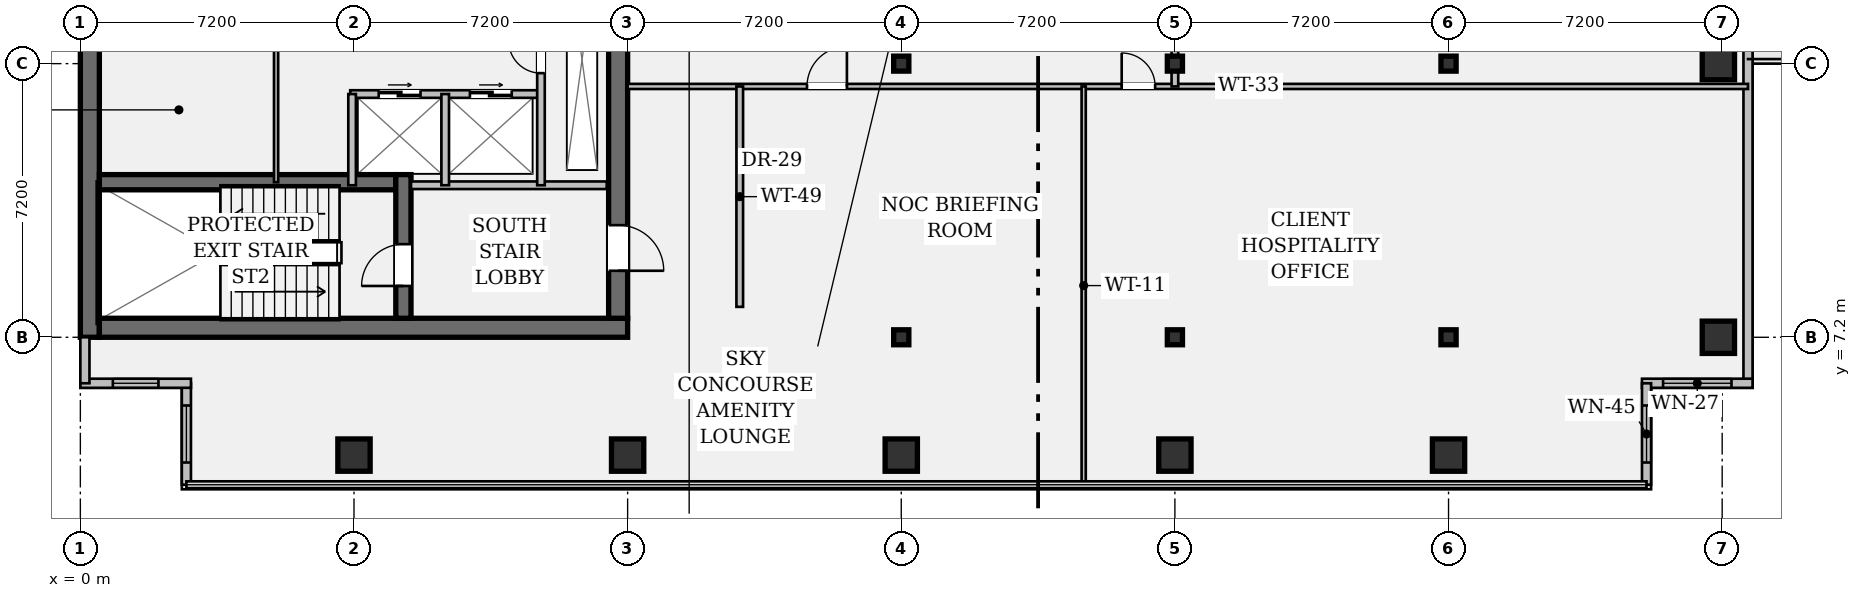
"""IFC4 building model, lengths in metres.
Left out: names, types, materials, properties, quantities, classifications, styles, units other than length and angle.
Written with IfcOpenShell. Run it as: python <this file> out.ifc"""

import sys

from ifc_helpers import new_model, si_unit, direction, frame, frame_2d, origin, origin_2d, place, context, subcontext, project, spatial, rectangle, hollow_rectangle, i_section, extrude, element, fill, save


model = new_model("IFC4")
c1 = context("Model", 3, precision=1e-05, world=origin(), true_north=direction((0.0, 1.0)))
c2 = subcontext(c1, "Body", "Model", "MODEL_VIEW")
j1 = project(units=[si_unit("LENGTHUNIT", "METRE"), si_unit("PLANEANGLEUNIT", "RADIAN")], contexts=[c1])
p1 = place(None, origin())
s1 = spatial("IfcSite", under=j1, at=p1, CompositionType="ELEMENT")
p2 = place(p1, origin())
s2 = spatial("IfcBuilding", under=s1, at=p2, CompositionType="ELEMENT")
p3 = place(p2, frame((0.0, 0.0, 168.7)))
s3 = spatial("IfcBuildingStorey", under=s2, at=p3, CompositionType="ELEMENT", Elevation=168.7)
p4 = place(p3, frame((0.25, 7.2, 0.0), z_axis=(0.0, 0.0, 1.0), x_axis=(0.0, 1.0, 0.0)))
e1 = element("IfcWall", 1, at=p4, inside=s3, PredefinedType="SHEAR", context=c2, shape_type="SweptSolid", body=[
    extrude(rectangle(XDim=28.8, YDim=0.5, at=frame_2d((14.4, 0.0))), origin(), (0.0, 0.0, 1.0), 4.29),
])
p5 = place(p3, frame((0.5, 7.45, 0.0), z_axis=(0.0, 0.0, 1.0), x_axis=(1.0, 0.0, 0.0)))
e2 = element("IfcWall", 2, at=p5, inside=s3, PredefinedType="SHEAR", context=c2, shape_type="SweptSolid", body=[
    extrude(rectangle(XDim=13.9, YDim=0.5, at=frame_2d((6.95, 0.0))), origin(), (0.0, 0.0, 1.0), 4.29),
])
p6 = place(p3, frame((14.15, 35.5, 0.0), z_axis=(0.0, 0.0, 1.0), x_axis=(0.0, -1.0, 0.0)))
e3 = element("IfcWall", 3, at=p6, inside=s3, PredefinedType="SHEAR", context=c2, shape_type="SweptSolid", body=[
    extrude(rectangle(XDim=27.8, YDim=0.5, at=frame_2d((13.9, 0.0))), origin(), (0.0, 0.0, 1.0), 4.29),
])
p7 = place(p6, frame((1.4, 0.0, 0.0)))
e4 = element("IfcOpeningElement", 4, at=p7, cuts=e3, PredefinedType="OPENING", context=c2, shape_type="SweptSolid", body=[
    extrude(rectangle(XDim=1.2, YDim=2.15, at=frame_2d((0.6, 1.075))), frame((0.0, 0.262, 0.0), z_axis=(0.0, -1.0, 0.0), x_axis=(1.0, 0.0, 0.0)), (0.0, 0.0, 1.0), 0.524),
])
p8 = place(p6, frame((25.35, 0.0, 0.0)))
e5 = element("IfcOpeningElement", 5, at=p8, cuts=e3, PredefinedType="OPENING", context=c2, shape_type="SweptSolid", body=[
    extrude(rectangle(XDim=1.2, YDim=2.15, at=frame_2d((0.6, 1.075))), frame((0.0, 0.262, 0.0), z_axis=(0.0, -1.0, 0.0), x_axis=(1.0, 0.0, 0.0)), (0.0, 0.0, 1.0), 0.524),
])
p9 = place(p6, frame((14.7, 0.0, 0.0)))
e6 = element("IfcOpeningElement", 6, at=p9, cuts=e3, PredefinedType="OPENING", context=c2, shape_type="SweptSolid", body=[
    extrude(rectangle(XDim=1.6, YDim=2.2, at=frame_2d((0.8, 1.1))), frame((0.0, 0.262, 0.0), z_axis=(0.0, -1.0, 0.0), x_axis=(1.0, 0.0, 0.0)), (0.0, 0.0, 1.0), 0.524),
])
p10 = place(p3, frame((0.5, 11.28, 0.0), z_axis=(0.0, 0.0, 1.0), x_axis=(1.0, 0.0, 0.0)))
e7 = element("IfcWall", 7, at=p10, inside=s3, PredefinedType="SHEAR", context=c2, shape_type="SweptSolid", body=[
    extrude(rectangle(XDim=7.8, YDim=0.4, at=frame_2d((3.9, 0.0))), origin(), (0.0, 0.0, 1.0), 4.29),
])
p11 = place(p3, frame((8.5, 7.7, 0.0), z_axis=(0.0, 0.0, 1.0), x_axis=(0.0, 1.0, 0.0)))
e8 = element("IfcWall", 8, at=p11, inside=s3, PredefinedType="SHEAR", context=c2, shape_type="SweptSolid", body=[
    extrude(rectangle(XDim=3.78, YDim=0.4, at=frame_2d((1.89, 0.0))), origin(), (0.0, 0.0, 1.0), 4.29),
])
p12 = place(p11, frame((0.85, 0.0, 0.0)))
e9 = element("IfcOpeningElement", 9, at=p12, cuts=e8, PredefinedType="OPENING", context=c2, shape_type="SweptSolid", body=[
    extrude(rectangle(XDim=1.1, YDim=2.15, at=frame_2d((0.55, 1.075))), frame((0.0, 0.212, 0.0), z_axis=(0.0, -1.0, 0.0), x_axis=(1.0, 0.0, 0.0)), (0.0, 0.0, 1.0), 0.424),
])
for number, where, z_axis, x_axis in (
    (10, (7.2, 4.1, 0.0), (0.0, 0.0, 1.0), (1.0, 0.0, 0.0)),
    (11, (14.4, 4.1, 0.0), (0.0, 0.0, 1.0), (1.0, 0.0, 0.0)),
    (12, (21.6, 4.1, 0.0), (0.0, 0.0, 1.0), (1.0, 0.0, 0.0)),
):
    element("IfcColumn", number, at=place(p3, frame(where, z_axis=z_axis, x_axis=x_axis)), inside=s3, PredefinedType="COLUMN", context=c2, shape_type="SweptSolid", body=[
        extrude(hollow_rectangle(XDim=0.85, YDim=0.85, WallThickness=0.05, at=origin_2d()), origin(), (0.0, 0.0, 1.0), 4.29),
    ])
for number, where, z_axis, x_axis in (
    (13, (21.6, 7.2, 0.0), (0.0, 0.0, 1.0), (1.0, 0.0, 0.0)),
    (14, (21.6, 14.4, 0.0), (0.0, 0.0, 1.0), (1.0, 0.0, 0.0)),
):
    element("IfcColumn", number, at=place(p3, frame(where, z_axis=z_axis, x_axis=x_axis)), inside=s3, PredefinedType="COLUMN", context=c2, shape_type="SweptSolid", body=[
        extrude(i_section(OverallWidth=0.399, OverallDepth=0.394, WebThickness=0.023, FlangeThickness=0.037, FilletRadius=0.018, at=origin_2d()), origin(), (0.0, 0.0, 1.0), 4.29),
    ])
p13 = place(p3, frame((28.8, 4.1, 0.0), z_axis=(0.0, 0.0, 1.0), x_axis=(1.0, 0.0, 0.0)))
e15 = element("IfcColumn", 15, at=p13, inside=s3, PredefinedType="COLUMN", context=c2, shape_type="SweptSolid", body=[
    extrude(hollow_rectangle(XDim=0.85, YDim=0.85, WallThickness=0.05, at=origin_2d()), origin(), (0.0, 0.0, 1.0), 4.29),
])
for number, where, z_axis, x_axis in (
    (16, (28.8, 7.2, 0.0), (0.0, 0.0, 1.0), (1.0, 0.0, 0.0)),
    (17, (28.8, 14.4, 0.0), (0.0, 0.0, 1.0), (1.0, 0.0, 0.0)),
):
    element("IfcColumn", number, at=place(p3, frame(where, z_axis=z_axis, x_axis=x_axis)), inside=s3, PredefinedType="COLUMN", context=c2, shape_type="SweptSolid", body=[
        extrude(i_section(OverallWidth=0.399, OverallDepth=0.394, WebThickness=0.023, FlangeThickness=0.037, FilletRadius=0.018, at=origin_2d()), origin(), (0.0, 0.0, 1.0), 4.29),
    ])
p14 = place(p3, frame((36.0, 4.1, 0.0), z_axis=(0.0, 0.0, 1.0), x_axis=(1.0, 0.0, 0.0)))
e18 = element("IfcColumn", 18, at=p14, inside=s3, PredefinedType="COLUMN", context=c2, shape_type="SweptSolid", body=[
    extrude(hollow_rectangle(XDim=0.85, YDim=0.85, WallThickness=0.05, at=origin_2d()), origin(), (0.0, 0.0, 1.0), 4.29),
])
for number, where, z_axis, x_axis in (
    (19, (36.0, 7.2, 0.0), (0.0, 0.0, 1.0), (1.0, 0.0, 0.0)),
    (20, (36.0, 14.4, 0.0), (0.0, 0.0, 1.0), (1.0, 0.0, 0.0)),
):
    element("IfcColumn", number, at=place(p3, frame(where, z_axis=z_axis, x_axis=x_axis)), inside=s3, PredefinedType="COLUMN", context=c2, shape_type="SweptSolid", body=[
        extrude(i_section(OverallWidth=0.399, OverallDepth=0.394, WebThickness=0.023, FlangeThickness=0.037, FilletRadius=0.018, at=origin_2d()), origin(), (0.0, 0.0, 1.0), 4.29),
    ])
for number, where, z_axis, x_axis in (
    (21, (43.1, 7.2, 0.0), (0.0, 0.0, 1.0), (1.0, 0.0, 0.0)),
    (22, (43.1, 14.4, 0.0), (0.0, 0.0, 1.0), (1.0, 0.0, 0.0)),
):
    element("IfcColumn", number, at=place(p3, frame(where, z_axis=z_axis, x_axis=x_axis)), inside=s3, PredefinedType="COLUMN", context=c2, shape_type="SweptSolid", body=[
        extrude(hollow_rectangle(XDim=0.85, YDim=0.85, WallThickness=0.05, at=origin_2d()), origin(), (0.0, 0.0, 1.0), 4.29),
    ])
p15 = place(p3, frame((2.79, 3.32, 0.0), z_axis=(0.0, 0.0, 1.0), x_axis=(0.0, 1.0, 0.0)))
e23 = element("IfcWall", 23, at=p15, inside=s3, PredefinedType="STANDARD", context=c2, shape_type="SweptSolid", body=[
    extrude(rectangle(XDim=2.67, YDim=0.24, at=frame_2d((1.335, 0.0))), origin(), (0.0, 0.0, 1.0), 4.29),
])
p16 = place(p15, frame((0.585, 0.0, 0.95)))
e24 = element("IfcOpeningElement", 24, at=p16, cuts=e23, PredefinedType="OPENING", context=c2, shape_type="SweptSolid", body=[
    extrude(rectangle(XDim=1.5, YDim=1.8, at=frame_2d((0.75, 0.9))), frame((0.0, 0.132, 0.0), z_axis=(0.0, -1.0, 0.0), x_axis=(1.0, 0.0, 0.0)), (0.0, 0.0, 1.0), 0.264),
])
p17 = place(p3, frame((2.91, 5.99, 0.0), z_axis=(0.0, 0.0, 1.0), x_axis=(-1.0, 0.0, 0.0)))
e25 = element("IfcWall", 25, at=p17, inside=s3, PredefinedType="STANDARD", context=c2, shape_type="SweptSolid", body=[
    extrude(rectangle(XDim=2.91, YDim=0.24, at=frame_2d((1.455, 0.0))), origin(), (0.0, 0.0, 1.0), 4.29),
])
p18 = place(p17, frame((0.855, 0.0, 0.95)))
e26 = element("IfcOpeningElement", 26, at=p18, cuts=e25, PredefinedType="OPENING", context=c2, shape_type="SweptSolid", body=[
    extrude(rectangle(XDim=1.2, YDim=1.8, at=frame_2d((0.6, 0.9))), frame((0.0, 0.132, 0.0), z_axis=(0.0, -1.0, 0.0), x_axis=(1.0, 0.0, 0.0)), (0.0, 0.0, 1.0), 0.264),
])
p19 = place(p3, frame((0.12, 5.99, 0.0), z_axis=(0.0, 0.0, 1.0), x_axis=(0.0, 1.0, 0.0)))
e27 = element("IfcWall", 27, at=p19, inside=s3, PredefinedType="STANDARD", context=c2, shape_type="SweptSolid", body=[
    extrude(rectangle(XDim=1.21, YDim=0.24, at=frame_2d((0.605, 0.0))), origin(), (0.0, 0.0, 1.0), 4.29),
])
p20 = place(p3, frame((43.88, 22.41, 0.0), z_axis=(0.0, 0.0, 1.0), x_axis=(0.0, -1.0, 0.0)))
e28 = element("IfcWall", 28, at=p20, inside=s3, PredefinedType="STANDARD", context=c2, shape_type="SweptSolid", body=[
    extrude(rectangle(XDim=16.42, YDim=0.24, at=frame_2d((8.21, 0.0))), origin(), (0.0, 0.0, 1.0), 2.875),
])
p21 = place(p20, frame((3.61, 0.0, 0.0)))
e29 = element("IfcOpeningElement", 29, at=p21, cuts=e28, PredefinedType="OPENING", context=c2, shape_type="SweptSolid", body=[
    extrude(rectangle(XDim=1.6, YDim=2.2, at=frame_2d((0.8, 1.1))), frame((0.0, 0.132, 0.0), z_axis=(0.0, -1.0, 0.0), x_axis=(1.0, 0.0, 0.0)), (0.0, 0.0, 1.0), 0.264),
])
p22 = place(p3, frame((44.0, 5.99, 0.0), z_axis=(0.0, 0.0, 1.0), x_axis=(-1.0, 0.0, 0.0)))
e30 = element("IfcWall", 30, at=p22, inside=s3, PredefinedType="STANDARD", context=c2, shape_type="SweptSolid", body=[
    extrude(rectangle(XDim=2.91, YDim=0.24, at=frame_2d((1.455, 0.0))), origin(), (0.0, 0.0, 1.0), 4.29),
])
p23 = place(p22, frame((0.555, 0.0, 0.95)))
e31 = element("IfcOpeningElement", 31, at=p23, cuts=e30, PredefinedType="OPENING", context=c2, shape_type="SweptSolid", body=[
    extrude(rectangle(XDim=1.8, YDim=1.35, at=frame_2d((0.9, 0.675))), frame((0.0, 0.132, 0.0), z_axis=(0.0, -1.0, 0.0), x_axis=(1.0, 0.0, 0.0)), (0.0, 0.0, 1.0), 0.264),
])
p24 = place(p3, frame((41.21, 5.99, 0.0), z_axis=(0.0, 0.0, 1.0), x_axis=(0.0, -1.0, 0.0)))
e32 = element("IfcWall", 32, at=p24, inside=s3, PredefinedType="STANDARD", context=c2, shape_type="SweptSolid", body=[
    extrude(rectangle(XDim=2.67, YDim=0.24, at=frame_2d((1.335, 0.0))), origin(), (0.0, 0.0, 1.0), 4.29),
])
p25 = place(p24, frame((0.585, 0.0, 0.95)))
e33 = element("IfcOpeningElement", 33, at=p25, cuts=e32, PredefinedType="OPENING", context=c2, shape_type="SweptSolid", body=[
    extrude(rectangle(XDim=1.5, YDim=1.8, at=frame_2d((0.75, 0.9))), frame((0.0, 0.132, 0.0), z_axis=(0.0, -1.0, 0.0), x_axis=(1.0, 0.0, 0.0)), (0.0, 0.0, 1.0), 0.264),
])
p26 = place(p3, frame((8.7, 11.2, 0.0), z_axis=(0.0, 0.0, 1.0), x_axis=(1.0, 0.0, 0.0)))
e34 = element("IfcWall", 34, at=p26, inside=s3, PredefinedType="PARTITIONING", context=c2, shape_type="SweptSolid", body=[
    extrude(rectangle(XDim=5.15, YDim=0.2, at=frame_2d((2.575, 0.0))), origin(), (0.0, 0.0, 1.0), 4.29),
])
p27 = place(p3, frame((7.1, 13.6, 0.0), z_axis=(0.0, 0.0, 1.0), x_axis=(1.0, 0.0, 0.0)))
e35 = element("IfcWall", 35, at=p27, inside=s3, PredefinedType="PARTITIONING", context=c2, shape_type="SweptSolid", body=[
    extrude(rectangle(XDim=5.02, YDim=0.2, at=frame_2d((2.51, 0.0))), origin(), (0.0, 0.0, 1.0), 4.29),
])
p28 = place(p27, frame((0.75, 0.0, 0.0)))
e36 = element("IfcOpeningElement", 36, at=p28, cuts=e35, PredefinedType="OPENING", context=c2, shape_type="SweptSolid", body=[
    extrude(rectangle(XDim=1.1, YDim=2.2, at=frame_2d((0.55, 1.1))), frame((0.0, 0.112, 0.0), z_axis=(0.0, -1.0, 0.0), x_axis=(1.0, 0.0, 0.0)), (0.0, 0.0, 1.0), 0.224),
])
p29 = place(p27, frame((3.15, 0.0, 0.0)))
e37 = element("IfcOpeningElement", 37, at=p29, cuts=e35, PredefinedType="OPENING", context=c2, shape_type="SweptSolid", body=[
    extrude(rectangle(XDim=1.1, YDim=2.2, at=frame_2d((0.55, 1.1))), frame((0.0, 0.112, 0.0), z_axis=(0.0, -1.0, 0.0), x_axis=(1.0, 0.0, 0.0)), (0.0, 0.0, 1.0), 0.224),
])
for number, where, z_axis, x_axis in (
    (38, (7.15, 11.2, 0.0), (0.0, 0.0, 1.0), (0.0, 1.0, 0.0)),
    (39, (9.6, 11.2, 0.0), (0.0, 0.0, 1.0), (0.0, 1.0, 0.0)),
):
    element("IfcWall", number, at=place(p3, frame(where, z_axis=z_axis, x_axis=x_axis)), inside=s3, PredefinedType="PARTITIONING", context=c2, shape_type="SweptSolid", body=[
        extrude(rectangle(XDim=2.4, YDim=0.2, at=frame_2d((1.2, 0.0))), origin(), (0.0, 0.0, 1.0), 4.29),
    ])
p30 = place(p3, frame((12.12, 11.2, 0.0), z_axis=(0.0, 0.0, 1.0), x_axis=(0.0, 1.0, 0.0)))
e40 = element("IfcWall", 40, at=p30, inside=s3, PredefinedType="PARTITIONING", context=c2, shape_type="SweptSolid", body=[
    extrude(rectangle(XDim=6.6, YDim=0.2, at=frame_2d((3.3, 0.0))), origin(), (0.0, 0.0, 1.0), 4.29),
])
p31 = place(p30, frame((2.95, 0.0, 0.0)))
e41 = element("IfcOpeningElement", 41, at=p31, cuts=e40, PredefinedType="OPENING", context=c2, shape_type="SweptSolid", body=[
    extrude(rectangle(XDim=0.85, YDim=2.15, at=frame_2d((0.425, 1.075))), frame((0.0, 0.112, 0.0), z_axis=(0.0, -1.0, 0.0), x_axis=(1.0, 0.0, 0.0)), (0.0, 0.0, 1.0), 0.224),
])
p32 = place(p3, frame((5.15, 11.28, 0.0), z_axis=(0.0, 0.0, 1.0), x_axis=(0.0, 1.0, 0.0)))
e42 = element("IfcWall", 42, at=p32, inside=s3, PredefinedType="PARTITIONING", context=c2, shape_type="SweptSolid", body=[
    extrude(rectangle(XDim=4.42, YDim=0.11, at=frame_2d((2.21, 0.0))), origin(), (0.0, 0.0, 1.0), 4.29),
])
p33 = place(p3, frame((14.4, 13.8, 0.0), z_axis=(0.0, 0.0, 1.0), x_axis=(1.0, 0.0, 0.0)))
e43 = element("IfcWall", 43, at=p33, inside=s3, PredefinedType="PARTITIONING", context=c2, shape_type="SweptSolid", body=[
    extrude(rectangle(XDim=29.48, YDim=0.135, at=frame_2d((14.74, 0.0))), origin(), (0.0, 0.0, 1.0), 3.653),
])
p34 = place(p33, frame((4.72, 0.0, 0.0)))
e44 = element("IfcOpeningElement", 44, at=p34, cuts=e43, PredefinedType="OPENING", context=c2, shape_type="SweptSolid", body=[
    extrude(rectangle(XDim=1.05, YDim=2.15, at=frame_2d((0.525, 1.075))), frame((0.0, 0.08, 0.0), z_axis=(0.0, -1.0, 0.0), x_axis=(1.0, 0.0, 0.0)), (0.0, 0.0, 1.0), 0.159),
])
p35 = place(p33, frame((13.0, 0.0, 0.0)))
e45 = element("IfcOpeningElement", 45, at=p35, cuts=e43, PredefinedType="OPENING", context=c2, shape_type="SweptSolid", body=[
    extrude(rectangle(XDim=0.88, YDim=2.15, at=frame_2d((0.44, 1.075))), frame((0.0, 0.08, 0.0), z_axis=(0.0, -1.0, 0.0), x_axis=(1.0, 0.0, 0.0)), (0.0, 0.0, 1.0), 0.159),
])
p36 = place(p3, frame((26.4, 3.32, 0.0), z_axis=(0.0, 0.0, 1.0), x_axis=(0.0, 1.0, 0.0)))
e46 = element("IfcWall", 46, at=p36, inside=s3, PredefinedType="PARTITIONING", context=c2, shape_type="SweptSolid", body=[
    extrude(rectangle(XDim=10.48, YDim=0.11, at=frame_2d((5.24, 0.0))), origin(), (0.0, 0.0, 1.0), 3.653),
])
p37 = place(p3, frame((17.35, 8.0, 0.0), z_axis=(0.0, 0.0, 1.0), x_axis=(0.0, 1.0, 0.0)))
e47 = element("IfcWall", 47, at=p37, inside=s3, PredefinedType="PARTITIONING", context=c2, shape_type="SweptSolid", body=[
    extrude(rectangle(XDim=5.8, YDim=0.175, at=frame_2d((2.9, 0.0))), origin(), (0.0, 0.0, 1.0), 4.29),
])
p38 = place(p3, frame((28.8, 13.8, 0.0), z_axis=(0.0, 0.0, 1.0), x_axis=(0.0, 1.0, 0.0)))
e48 = element("IfcWall", 48, at=p38, inside=s3, PredefinedType="PARTITIONING", context=c2, shape_type="SweptSolid", body=[
    extrude(rectangle(XDim=8.2, YDim=0.175, at=frame_2d((4.1, 0.0))), origin(), (0.0, 0.0, 1.0), 3.653),
])
p39 = place(p38, frame((2.9, 0.0, 0.0)))
e49 = element("IfcOpeningElement", 49, at=p39, cuts=e48, PredefinedType="OPENING", context=c2, shape_type="SweptSolid", body=[
    extrude(rectangle(XDim=1.6, YDim=2.2, at=frame_2d((0.8, 1.1))), frame((0.0, 0.1, 0.0), z_axis=(0.0, -1.0, 0.0), x_axis=(1.0, 0.0, 0.0)), (0.0, 0.0, 1.0), 0.199),
])
p40 = place(p16, origin())
e50 = element("IfcWindow", 50, at=p40, inside=s3, PartitioningType="SINGLE_PANEL", PredefinedType="WINDOW", context=c2, shape_type="SweptSolid", body=[
    extrude(rectangle(XDim=1.5, YDim=1.8, at=frame_2d((0.75, 0.9))), frame((0.0, 0.03, 0.0), z_axis=(0.0, -1.0, 0.0), x_axis=(1.0, 0.0, 0.0)), (0.0, 0.0, 1.0), 0.06),
])
fill(e24, e50)
p41 = place(p18, origin())
e51 = element("IfcWindow", 51, at=p41, inside=s3, PartitioningType="SINGLE_PANEL", PredefinedType="WINDOW", context=c2, shape_type="SweptSolid", body=[
    extrude(rectangle(XDim=1.2, YDim=1.8, at=frame_2d((0.6, 0.9))), frame((0.0, 0.03, 0.0), z_axis=(0.0, -1.0, 0.0), x_axis=(1.0, 0.0, 0.0)), (0.0, 0.0, 1.0), 0.06),
])
fill(e26, e51)
p42 = place(p23, origin())
e52 = element("IfcWindow", 52, at=p42, inside=s3, PartitioningType="SINGLE_PANEL", PredefinedType="WINDOW", context=c2, shape_type="SweptSolid", body=[
    extrude(rectangle(XDim=1.8, YDim=1.35, at=frame_2d((0.9, 0.675))), frame((0.0, 0.03, 0.0), z_axis=(0.0, -1.0, 0.0), x_axis=(1.0, 0.0, 0.0)), (0.0, 0.0, 1.0), 0.06),
])
fill(e31, e52)
p43 = place(p25, origin())
e53 = element("IfcWindow", 53, at=p43, inside=s3, PartitioningType="SINGLE_PANEL", PredefinedType="WINDOW", context=c2, shape_type="SweptSolid", body=[
    extrude(rectangle(XDim=1.5, YDim=1.8, at=frame_2d((0.75, 0.9))), frame((0.0, 0.03, 0.0), z_axis=(0.0, -1.0, 0.0), x_axis=(1.0, 0.0, 0.0)), (0.0, 0.0, 1.0), 0.06),
])
fill(e33, e53)
p44 = place(p12, origin())
e54 = element("IfcDoor", 54, at=p44, inside=s3, OperationType="SINGLE_SWING_LEFT", PredefinedType="DOOR", context=c2, shape_type="SweptSolid", body=[
    extrude(rectangle(XDim=1.1, YDim=2.15, at=frame_2d((0.55, 1.075))), frame((0.0, 0.025, 0.0), z_axis=(0.0, -1.0, 0.0), x_axis=(1.0, 0.0, 0.0)), (0.0, 0.0, 1.0), 0.05),
])
fill(e9, e54)
p45 = place(p8, origin())
e55 = element("IfcDoor", 55, at=p45, inside=s3, OperationType="SINGLE_SWING_RIGHT", PredefinedType="DOOR", context=c2, shape_type="SweptSolid", body=[
    extrude(rectangle(XDim=1.2, YDim=2.15, at=frame_2d((0.6, 1.075))), frame((0.0, 0.025, 0.0), z_axis=(0.0, -1.0, 0.0), x_axis=(1.0, 0.0, 0.0)), (0.0, 0.0, 1.0), 0.05),
])
fill(e5, e55)
p46 = place(p31, origin())
e56 = element("IfcDoor", 56, at=p46, inside=s3, OperationType="SINGLE_SWING_RIGHT", PredefinedType="DOOR", context=c2, shape_type="SweptSolid", body=[
    extrude(rectangle(XDim=0.85, YDim=2.15, at=frame_2d((0.425, 1.075))), frame((0.0, 0.025, 0.0), z_axis=(0.0, -1.0, 0.0), x_axis=(1.0, 0.0, 0.0)), (0.0, 0.0, 1.0), 0.05),
])
fill(e41, e56)
p47 = place(p28, origin())
e57 = element("IfcDoor", 57, at=p47, inside=s3, OperationType="DOUBLE_DOOR_SLIDING", PredefinedType="DOOR", context=c2, shape_type="SweptSolid", body=[
    extrude(rectangle(XDim=1.1, YDim=2.2, at=frame_2d((0.55, 1.1))), frame((0.0, 0.025, 0.0), z_axis=(0.0, -1.0, 0.0), x_axis=(1.0, 0.0, 0.0)), (0.0, 0.0, 1.0), 0.05),
])
fill(e36, e57)
p48 = place(p29, origin())
e58 = element("IfcDoor", 58, at=p48, inside=s3, OperationType="DOUBLE_DOOR_SLIDING", PredefinedType="DOOR", context=c2, shape_type="SweptSolid", body=[
    extrude(rectangle(XDim=1.1, YDim=2.2, at=frame_2d((0.55, 1.1))), frame((0.0, 0.025, 0.0), z_axis=(0.0, -1.0, 0.0), x_axis=(1.0, 0.0, 0.0)), (0.0, 0.0, 1.0), 0.05),
])
fill(e37, e58)
p49 = place(p34, origin())
e59 = element("IfcDoor", 59, at=p49, inside=s3, OperationType="SINGLE_SWING_RIGHT", PredefinedType="DOOR", context=c2, shape_type="SweptSolid", body=[
    extrude(rectangle(XDim=1.05, YDim=2.15, at=frame_2d((0.525, 1.075))), frame((0.0, 0.025, 0.0), z_axis=(0.0, -1.0, 0.0), x_axis=(1.0, 0.0, 0.0)), (0.0, 0.0, 1.0), 0.05),
])
fill(e44, e59)
p50 = place(p35, origin())
e60 = element("IfcDoor", 60, at=p50, inside=s3, OperationType="SINGLE_SWING_LEFT", PredefinedType="DOOR", context=c2, shape_type="SweptSolid", body=[
    extrude(rectangle(XDim=0.88, YDim=2.15, at=frame_2d((0.44, 1.075))), frame((0.0, 0.025, 0.0), z_axis=(0.0, -1.0, 0.0), x_axis=(1.0, 0.0, 0.0)), (0.0, 0.0, 1.0), 0.05),
])
fill(e45, e60)
save(model, sys.argv[1])
